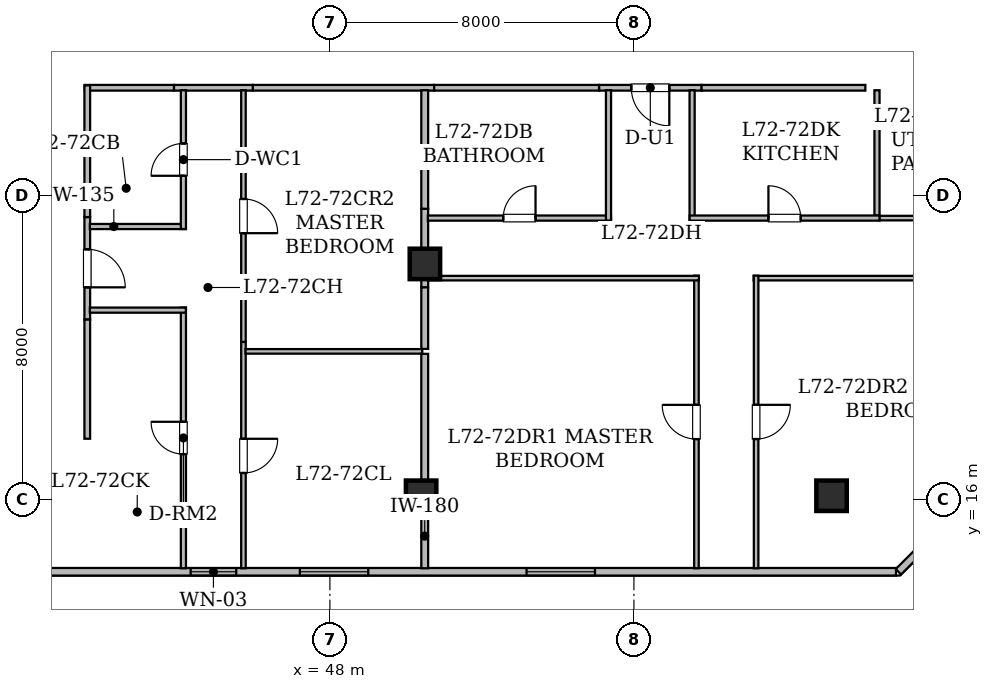
"""IFC4 building model, lengths in metres.
Left out: names, types, materials, properties, quantities, classifications, styles, units other than length and angle.
Written with IfcOpenShell. Run it as: python <this file> out.ifc"""

import sys

from ifc_helpers import new_model, si_unit, direction, frame, frame_2d, origin, origin_2d, place, context, subcontext, project, spatial, rectangle, hollow_rectangle, extrude, element, fill, save


model = new_model("IFC4")
c1 = context("Model", 3, precision=1e-05, world=origin(), true_north=direction((0.0, 1.0)))
c2 = subcontext(c1, "Body", "Model", "MODEL_VIEW")
j1 = project(units=[si_unit("LENGTHUNIT", "METRE"), si_unit("PLANEANGLEUNIT", "RADIAN")], contexts=[c1])
p1 = place(None, origin())
s1 = spatial("IfcSite", under=j1, at=p1, CompositionType="ELEMENT")
p2 = place(p1, origin())
s2 = spatial("IfcBuilding", under=s1, at=p2, CompositionType="ELEMENT")
p3 = place(p2, frame((0.0, 0.0, 282.05)))
s3 = spatial("IfcBuildingStorey", under=s2, at=p3, CompositionType="ELEMENT", Elevation=282.05)
for number, where, z_axis, x_axis in (
    (1, (50.4, 16.1, 0.0), (0.0, 0.0, 1.0), (1.0, 0.0, 0.0)),
    (2, (61.2, 16.1, 0.0), (0.0, 0.0, 1.0), (1.0, 0.0, 0.0)),
):
    element("IfcColumn", number, at=place(p3, frame(where, z_axis=z_axis, x_axis=x_axis)), inside=s3, PredefinedType="COLUMN", context=c2, shape_type="SweptSolid", body=[
        extrude(hollow_rectangle(XDim=0.8, YDim=0.8, WallThickness=0.04, at=origin_2d()), origin(), (0.0, 0.0, 1.0), 4.175),
    ])
p4 = place(p3, frame((50.5, 22.2, 0.0), z_axis=(0.0, 0.0, 1.0), x_axis=(1.0, 0.0, 0.0)))
e3 = element("IfcColumn", 3, at=p4, inside=s3, PredefinedType="COLUMN", context=c2, shape_type="SweptSolid", body=[
    extrude(hollow_rectangle(XDim=0.8, YDim=0.8, WallThickness=0.04, at=origin_2d()), origin(), (0.0, 0.0, 1.0), 4.2),
])
p5 = place(p3, frame((66.255, 17.396, 0.0), z_axis=(0.0, 0.0, 1.0), x_axis=(-0.707106781187, -0.707106781187, 0.0)))
e4 = element("IfcWall", 4, at=p5, inside=s3, PredefinedType="STANDARD", context=c2, shape_type="SweptSolid", body=[
    extrude(rectangle(XDim=4.661, YDim=0.2, at=frame_2d((2.331, 0.0))), origin(), (0.0, 0.0, 1.0), 3.78),
])
p6 = place(p3, frame((62.896, 14.1, 0.0), z_axis=(0.0, 0.0, 1.0), x_axis=(-1.0, 0.0, 0.0)))
e5 = element("IfcWall", 5, at=p6, inside=s3, PredefinedType="STANDARD", context=c2, shape_type="SweptSolid", body=[
    extrude(rectangle(XDim=35.793, YDim=0.2, at=frame_2d((17.896, 0.0))), origin(), (0.0, 0.0, 1.0), 3.78),
])
p7 = place(p6, frame((17.361, 0.0, 0.78)))
e6 = element("IfcOpeningElement", 6, at=p7, cuts=e5, PredefinedType="OPENING", context=c2, shape_type="SweptSolid", body=[
    extrude(rectangle(XDim=1.2, YDim=1.5, at=frame_2d((0.6, 0.75))), frame((0.0, 0.11, 0.0), z_axis=(0.0, -1.0, 0.0), x_axis=(1.0, 0.0, 0.0)), (0.0, 0.0, 1.0), 0.22),
])
p8 = place(p6, frame((13.886, 0.0, 0.85)))
e7 = element("IfcOpeningElement", 7, at=p8, cuts=e5, PredefinedType="OPENING", context=c2, shape_type="SweptSolid", body=[
    extrude(rectangle(XDim=1.8, YDim=0.92, at=frame_2d((0.9, 0.46))), frame((0.0, 0.11, 0.0), z_axis=(0.0, -1.0, 0.0), x_axis=(1.0, 0.0, 0.0)), (0.0, 0.0, 1.0), 0.22),
])
p9 = place(p6, frame((7.921, 0.0, 0.85)))
e8 = element("IfcOpeningElement", 8, at=p9, cuts=e5, PredefinedType="OPENING", context=c2, shape_type="SweptSolid", body=[
    extrude(rectangle(XDim=1.8, YDim=0.92, at=frame_2d((0.9, 0.46))), frame((0.0, 0.11, 0.0), z_axis=(0.0, -1.0, 0.0), x_axis=(1.0, 0.0, 0.0)), (0.0, 0.0, 1.0), 0.22),
])
p10 = place(p3, frame((45.974, 26.835, 0.0), z_axis=(0.0, 0.0, 1.0), x_axis=(-1.0, 0.0, 0.0)))
e9 = element("IfcWall", 9, at=p10, inside=s3, PredefinedType="STANDARD", context=c2, shape_type="SweptSolid", body=[
    extrude(rectangle(XDim=2.078, YDim=0.15, at=frame_2d((1.039, 0.0))), origin(), (0.0, 0.0, 1.0), 3.78),
])
p11 = place(p3, frame((41.615, 23.433, 0.0), z_axis=(0.0, 0.0, 1.0), x_axis=(0.0, -1.0, 0.0)))
e10 = element("IfcWall", 10, at=p11, inside=s3, PredefinedType="STANDARD", context=c2, shape_type="SweptSolid", body=[
    extrude(rectangle(XDim=2.698, YDim=0.15, at=frame_2d((1.349, 0.0))), origin(), (0.0, 0.0, 1.0), 2.22),
])
p12 = place(p11, frame((0.849, 0.0, 0.0)))
e11 = element("IfcOpeningElement", 11, at=p12, cuts=e10, PredefinedType="OPENING", context=c2, shape_type="SweptSolid", body=[
    extrude(rectangle(XDim=1.0, YDim=2.15, at=frame_2d((0.5, 1.075))), frame((0.0, 0.085, 0.0), z_axis=(0.0, -1.0, 0.0), x_axis=(1.0, 0.0, 0.0)), (0.0, 0.0, 1.0), 0.17),
])
p13 = place(p3, frame((43.896, 26.835, 0.0), z_axis=(0.0, 0.0, 1.0), x_axis=(-1.0, 0.0, 0.0)))
e12 = element("IfcWall", 12, at=p13, inside=s3, PredefinedType="STANDARD", context=c2, shape_type="SweptSolid", body=[
    extrude(rectangle(XDim=2.346, YDim=0.15, at=frame_2d((1.173, 0.0))), origin(), (0.0, 0.0, 1.0), 3.78),
])
p14 = place(p3, frame((41.615, 26.898, 0.0), z_axis=(0.0, 0.0, 1.0), x_axis=(0.0, -1.0, 0.0)))
e13 = element("IfcWall", 13, at=p14, inside=s3, PredefinedType="STANDARD", context=c2, shape_type="SweptSolid", body=[
    extrude(rectangle(XDim=3.465, YDim=0.15, at=frame_2d((1.732, 0.0))), origin(), (0.0, 0.0, 1.0), 2.22),
])
p15 = place(p3, frame((41.615, 20.735, 0.0), z_axis=(0.0, 0.0, 1.0), x_axis=(0.0, -1.0, 0.0)))
e14 = element("IfcWall", 14, at=p15, inside=s3, PredefinedType="STANDARD", context=c2, shape_type="SweptSolid", body=[
    extrude(rectangle(XDim=3.135, YDim=0.15, at=frame_2d((1.567, 0.0))), origin(), (0.0, 0.0, 1.0), 2.22),
])
p16 = place(p3, frame((50.744, 26.835, 0.0), z_axis=(0.0, 0.0, 1.0), x_axis=(-1.0, 0.0, 0.0)))
e15 = element("IfcWall", 15, at=p16, inside=s3, PredefinedType="STANDARD", context=c2, shape_type="SweptSolid", body=[
    extrude(rectangle(XDim=4.77, YDim=0.15, at=frame_2d((2.385, 0.0))), origin(), (0.0, 0.0, 1.0), 2.22),
])
p17 = place(p3, frame((57.78, 26.835, 0.0), z_axis=(0.0, 0.0, 1.0), x_axis=(-1.0, 0.0, 0.0)))
e16 = element("IfcWall", 16, at=p17, inside=s3, PredefinedType="STANDARD", context=c2, shape_type="SweptSolid", body=[
    extrude(rectangle(XDim=2.698, YDim=0.15, at=frame_2d((1.349, 0.0))), origin(), (0.0, 0.0, 1.0), 3.78),
])
p18 = place(p17, frame((0.849, 0.0, 0.0)))
e17 = element("IfcOpeningElement", 17, at=p18, cuts=e16, PredefinedType="OPENING", context=c2, shape_type="SweptSolid", body=[
    extrude(rectangle(XDim=1.0, YDim=2.15, at=frame_2d((0.5, 1.075))), frame((0.0, 0.085, 0.0), z_axis=(0.0, -1.0, 0.0), x_axis=(1.0, 0.0, 0.0)), (0.0, 0.0, 1.0), 0.17),
])
p19 = place(p3, frame((55.082, 26.835, 0.0), z_axis=(0.0, 0.0, 1.0), x_axis=(-1.0, 0.0, 0.0)))
e18 = element("IfcWall", 18, at=p19, inside=s3, PredefinedType="STANDARD", context=c2, shape_type="SweptSolid", body=[
    extrude(rectangle(XDim=4.338, YDim=0.15, at=frame_2d((2.169, 0.0))), origin(), (0.0, 0.0, 1.0), 2.22),
])
p20 = place(p3, frame((62.09, 26.835, 0.0), z_axis=(0.0, 0.0, 1.0), x_axis=(-1.0, 0.0, 0.0)))
e19 = element("IfcWall", 19, at=p20, inside=s3, PredefinedType="STANDARD", context=c2, shape_type="SweptSolid", body=[
    extrude(rectangle(XDim=4.31, YDim=0.15, at=frame_2d((2.155, 0.0))), origin(), (0.0, 0.0, 1.0), 3.78),
])
p21 = place(p3, frame((41.682, 23.184, 0.0), z_axis=(0.0, 0.0, 1.0), x_axis=(1.0, 0.0, 0.0)))
e20 = element("IfcWall", 20, at=p21, inside=s3, PredefinedType="PARTITIONING", context=c2, shape_type="SweptSolid", body=[
    extrude(rectangle(XDim=2.528, YDim=0.135, at=frame_2d((1.264, 0.0))), origin(), (0.0, 0.0, 1.0), 2.22),
])
p22 = place(p3, frame((44.145, 23.119, 0.0), z_axis=(0.0, 0.0, 1.0), x_axis=(0.0, 1.0, 0.0)))
e21 = element("IfcWall", 21, at=p22, inside=s3, PredefinedType="PARTITIONING", context=c2, shape_type="SweptSolid", body=[
    extrude(rectangle(XDim=3.651, YDim=0.135, at=frame_2d((1.826, 0.0))), origin(), (0.0, 0.0, 1.0), 2.22),
])
p23 = place(p22, frame((1.4, 0.0, 0.0)))
e22 = element("IfcOpeningElement", 22, at=p23, cuts=e21, PredefinedType="OPENING", context=c2, shape_type="SweptSolid", body=[
    extrude(rectangle(XDim=0.85, YDim=2.1, at=frame_2d((0.425, 1.05))), frame((0.0, 0.077, 0.0), z_axis=(0.0, -1.0, 0.0), x_axis=(1.0, 0.0, 0.0)), (0.0, 0.0, 1.0), 0.155),
])
p24 = place(p3, frame((44.145, 14.192, 0.0), z_axis=(0.0, 0.0, 1.0), x_axis=(0.0, 1.0, 0.0)))
e23 = element("IfcWall", 23, at=p24, inside=s3, PredefinedType="PARTITIONING", context=c2, shape_type="SweptSolid", body=[
    extrude(rectangle(XDim=6.857, YDim=0.135, at=frame_2d((3.429, 0.0))), origin(), (0.0, 0.0, 1.0), 2.22),
])
p25 = place(p24, frame((3.004, 0.0, 0.0)))
e24 = element("IfcOpeningElement", 24, at=p25, cuts=e23, PredefinedType="OPENING", context=c2, shape_type="SweptSolid", body=[
    extrude(rectangle(XDim=0.85, YDim=2.1, at=frame_2d((0.425, 1.05))), frame((0.0, 0.077, 0.0), z_axis=(0.0, -1.0, 0.0), x_axis=(1.0, 0.0, 0.0)), (0.0, 0.0, 1.0), 0.155),
])
p26 = place(p3, frame((44.21, 20.984, 0.0), z_axis=(0.0, 0.0, 1.0), x_axis=(-1.0, 0.0, 0.0)))
e25 = element("IfcWall", 25, at=p26, inside=s3, PredefinedType="PARTITIONING", context=c2, shape_type="SweptSolid", body=[
    extrude(rectangle(XDim=2.528, YDim=0.135, at=frame_2d((1.264, 0.0))), origin(), (0.0, 0.0, 1.0), 3.78),
])
p27 = place(p3, frame((45.725, 20.148, 0.0), z_axis=(0.0, 0.0, 1.0), x_axis=(0.0, -1.0, 0.0)))
e26 = element("IfcWall", 26, at=p27, inside=s3, PredefinedType="PARTITIONING", context=c2, shape_type="SweptSolid", body=[
    extrude(rectangle(XDim=5.956, YDim=0.12, at=frame_2d((2.978, 0.0))), origin(), (0.0, 0.0, 1.0), 2.22),
])
p28 = place(p27, frame((2.549, 0.0, 0.0)))
e27 = element("IfcOpeningElement", 27, at=p28, cuts=e26, PredefinedType="OPENING", context=c2, shape_type="SweptSolid", body=[
    extrude(rectangle(XDim=0.9, YDim=2.1, at=frame_2d((0.45, 1.05))), frame((0.0, 0.07, 0.0), z_axis=(0.0, -1.0, 0.0), x_axis=(1.0, 0.0, 0.0)), (0.0, 0.0, 1.0), 0.14),
])
p29 = place(p3, frame((45.725, 26.77, 0.0), z_axis=(0.0, 0.0, 1.0), x_axis=(0.0, -1.0, 0.0)))
e28 = element("IfcWall", 28, at=p29, inside=s3, PredefinedType="PARTITIONING", context=c2, shape_type="SweptSolid", body=[
    extrude(rectangle(XDim=6.622, YDim=0.12, at=frame_2d((3.311, 0.0))), origin(), (0.0, 0.0, 1.0), 2.22),
])
p30 = place(p29, frame((2.861, 0.0, 0.0)))
e29 = element("IfcOpeningElement", 29, at=p30, cuts=e28, PredefinedType="OPENING", context=c2, shape_type="SweptSolid", body=[
    extrude(rectangle(XDim=0.9, YDim=2.1, at=frame_2d((0.45, 1.05))), frame((0.0, 0.07, 0.0), z_axis=(0.0, -1.0, 0.0), x_axis=(1.0, 0.0, 0.0)), (0.0, 0.0, 1.0), 0.14),
])
p31 = place(p3, frame((45.779, 19.899, 0.0), z_axis=(0.0, 0.0, 1.0), x_axis=(1.0, 0.0, 0.0)))
e30 = element("IfcWall", 30, at=p31, inside=s3, PredefinedType="PARTITIONING", context=c2, shape_type="SweptSolid", body=[
    extrude(rectangle(XDim=4.651, YDim=0.12, at=frame_2d((2.325, 0.0))), origin(), (0.0, 0.0, 1.0), 2.837),
])
p32 = place(p3, frame((50.495, 19.834, 0.0), z_axis=(0.0, 0.0, 1.0), x_axis=(0.0, -1.0, 0.0)))
e31 = element("IfcWall", 31, at=p32, inside=s3, PredefinedType="STANDARD", context=c2, shape_type="SweptSolid", body=[
    extrude(rectangle(XDim=5.642, YDim=0.18, at=frame_2d((2.821, 0.0))), origin(), (0.0, 0.0, 1.0), 2.22),
])
p33 = place(p3, frame((50.495, 23.651, 0.0), z_axis=(0.0, 0.0, 1.0), x_axis=(0.0, -1.0, 0.0)))
e32 = element("IfcWall", 32, at=p33, inside=s3, PredefinedType="STANDARD", context=c2, shape_type="SweptSolid", body=[
    extrude(rectangle(XDim=2.069, YDim=0.18, at=frame_2d((1.034, 0.0))), origin(), (0.0, 0.0, 1.0), 2.22),
])
p34 = place(p3, frame((50.495, 26.77, 0.0), z_axis=(0.0, 0.0, 1.0), x_axis=(0.0, -1.0, 0.0)))
e33 = element("IfcWall", 33, at=p34, inside=s3, PredefinedType="STANDARD", context=c2, shape_type="SweptSolid", body=[
    extrude(rectangle(XDim=3.119, YDim=0.18, at=frame_2d((1.56, 0.0))), origin(), (0.0, 0.0, 1.0), 2.22),
])
p35 = place(p3, frame((50.495, 21.582, 0.0), z_axis=(0.0, 0.0, 1.0), x_axis=(0.0, -1.0, 0.0)))
e34 = element("IfcWall", 34, at=p35, inside=s3, PredefinedType="STANDARD", context=c2, shape_type="SweptSolid", body=[
    extrude(rectangle(XDim=1.618, YDim=0.18, at=frame_2d((0.809, 0.0))), origin(), (0.0, 0.0, 1.0), 2.837),
])
p36 = place(p3, frame((66.208, 23.406, 0.0), z_axis=(0.0, 0.0, 1.0), x_axis=(-1.0, 0.0, 0.0)))
e35 = element("IfcWall", 35, at=p36, inside=s3, PredefinedType="PARTITIONING", context=c2, shape_type="SweptSolid", body=[
    extrude(rectangle(XDim=3.747, YDim=0.12, at=frame_2d((1.874, 0.0))), origin(), (0.0, 0.0, 1.0), 2.22),
])
p37 = place(p36, frame((1.423, 0.0, 0.0)))
e36 = element("IfcOpeningElement", 36, at=p37, cuts=e35, PredefinedType="OPENING", context=c2, shape_type="SweptSolid", body=[
    extrude(rectangle(XDim=0.9, YDim=2.1, at=frame_2d((0.45, 1.05))), frame((0.0, 0.07, 0.0), z_axis=(0.0, -1.0, 0.0), x_axis=(1.0, 0.0, 0.0)), (0.0, 0.0, 1.0), 0.14),
])
p38 = place(p3, frame((62.396, 23.471, 0.0), z_axis=(0.0, 0.0, 1.0), x_axis=(0.0, 1.0, 0.0)))
e37 = element("IfcWall", 37, at=p38, inside=s3, PredefinedType="PARTITIONING", context=c2, shape_type="SweptSolid", body=[
    extrude(rectangle(XDim=3.299, YDim=0.135, at=frame_2d((1.649, 0.0))), origin(), (0.0, 0.0, 1.0), 2.22),
])
p39 = place(p3, frame((50.577, 23.406, 0.0), z_axis=(0.0, 0.0, 1.0), x_axis=(1.0, 0.0, 0.0)))
e38 = element("IfcWall", 38, at=p39, inside=s3, PredefinedType="PARTITIONING", context=c2, shape_type="SweptSolid", body=[
    extrude(rectangle(XDim=4.819, YDim=0.135, at=frame_2d((2.41, 0.0))), origin(), (0.0, 0.0, 1.0), 2.22),
])
p40 = place(p39, frame((1.984, 0.0, 0.0)))
e39 = element("IfcOpeningElement", 39, at=p40, cuts=e38, PredefinedType="OPENING", context=c2, shape_type="SweptSolid", body=[
    extrude(rectangle(XDim=0.85, YDim=2.1, at=frame_2d((0.425, 1.05))), frame((0.0, 0.077, 0.0), z_axis=(0.0, -1.0, 0.0), x_axis=(1.0, 0.0, 0.0)), (0.0, 0.0, 1.0), 0.155),
])
for number, where, z_axis, x_axis in (
    (40, (55.331, 23.341, 0.0), (0.0, 0.0, 1.0), (0.0, 1.0, 0.0)),
    (41, (57.531, 26.77, 0.0), (0.0, 0.0, 1.0), (0.0, -1.0, 0.0)),
):
    element("IfcWall", number, at=place(p3, frame(where, z_axis=z_axis, x_axis=x_axis)), inside=s3, PredefinedType="PARTITIONING", context=c2, shape_type="SweptSolid", body=[
        extrude(rectangle(XDim=3.429, YDim=0.135, at=frame_2d((1.714, 0.0))), origin(), (0.0, 0.0, 1.0), 3.78),
    ])
p41 = place(p3, frame((57.466, 23.406, 0.0), z_axis=(0.0, 0.0, 1.0), x_axis=(1.0, 0.0, 0.0)))
e42 = element("IfcWall", 42, at=p41, inside=s3, PredefinedType="PARTITIONING", context=c2, shape_type="SweptSolid", body=[
    extrude(rectangle(XDim=4.995, YDim=0.135, at=frame_2d((2.498, 0.0))), origin(), (0.0, 0.0, 1.0), 2.22),
])
p42 = place(p41, frame((2.073, 0.0, 0.0)))
e43 = element("IfcOpeningElement", 43, at=p42, cuts=e42, PredefinedType="OPENING", context=c2, shape_type="SweptSolid", body=[
    extrude(rectangle(XDim=0.85, YDim=2.1, at=frame_2d((0.425, 1.05))), frame((0.0, 0.077, 0.0), z_axis=(0.0, -1.0, 0.0), x_axis=(1.0, 0.0, 0.0)), (0.0, 0.0, 1.0), 0.155),
])
p43 = place(p3, frame((57.645, 14.192, 0.0), z_axis=(0.0, 0.0, 1.0), x_axis=(0.0, 1.0, 0.0)))
e44 = element("IfcWall", 44, at=p43, inside=s3, PredefinedType="PARTITIONING", context=c2, shape_type="SweptSolid", body=[
    extrude(rectangle(XDim=7.699, YDim=0.12, at=frame_2d((3.85, 0.0))), origin(), (0.0, 0.0, 1.0), 2.22),
])
p44 = place(p43, frame((3.399, 0.0, 0.0)))
e45 = element("IfcOpeningElement", 45, at=p44, cuts=e44, PredefinedType="OPENING", context=c2, shape_type="SweptSolid", body=[
    extrude(rectangle(XDim=0.9, YDim=2.1, at=frame_2d((0.45, 1.05))), frame((0.0, 0.07, 0.0), z_axis=(0.0, -1.0, 0.0), x_axis=(1.0, 0.0, 0.0)), (0.0, 0.0, 1.0), 0.14),
])
p45 = place(p3, frame((57.71, 21.826, 0.0), z_axis=(0.0, 0.0, 1.0), x_axis=(-1.0, 0.0, 0.0)))
e46 = element("IfcWall", 46, at=p45, inside=s3, PredefinedType="PARTITIONING", context=c2, shape_type="SweptSolid", body=[
    extrude(rectangle(XDim=7.133, YDim=0.12, at=frame_2d((3.566, 0.0))), origin(), (0.0, 0.0, 1.0), 2.22),
])
p46 = place(p3, frame((66.208, 21.826, 0.0), z_axis=(0.0, 0.0, 1.0), x_axis=(-1.0, 0.0, 0.0)))
e47 = element("IfcWall", 47, at=p46, inside=s3, PredefinedType="PARTITIONING", context=c2, shape_type="SweptSolid", body=[
    extrude(rectangle(XDim=7.058, YDim=0.12, at=frame_2d((3.529, 0.0))), origin(), (0.0, 0.0, 1.0), 2.22),
])
p47 = place(p3, frame((59.215, 21.891, 0.0), z_axis=(0.0, 0.0, 1.0), x_axis=(0.0, -1.0, 0.0)))
e48 = element("IfcWall", 48, at=p47, inside=s3, PredefinedType="PARTITIONING", context=c2, shape_type="SweptSolid", body=[
    extrude(rectangle(XDim=7.699, YDim=0.12, at=frame_2d((3.85, 0.0))), origin(), (0.0, 0.0, 1.0), 2.22),
])
p48 = place(p47, frame((3.399, 0.0, 0.0)))
e49 = element("IfcOpeningElement", 49, at=p48, cuts=e48, PredefinedType="OPENING", context=c2, shape_type="SweptSolid", body=[
    extrude(rectangle(XDim=0.9, YDim=2.1, at=frame_2d((0.45, 1.05))), frame((0.0, 0.07, 0.0), z_axis=(0.0, -1.0, 0.0), x_axis=(1.0, 0.0, 0.0)), (0.0, 0.0, 1.0), 0.14),
])
p49 = place(p7, origin())
e50 = element("IfcWindow", 50, at=p49, inside=s3, PartitioningType="SINGLE_PANEL", PredefinedType="WINDOW", context=c2, shape_type="SweptSolid", body=[
    extrude(rectangle(XDim=1.2, YDim=1.5, at=frame_2d((0.6, 0.75))), frame((0.0, 0.03, 0.0), z_axis=(0.0, -1.0, 0.0), x_axis=(1.0, 0.0, 0.0)), (0.0, 0.0, 1.0), 0.06),
])
fill(e6, e50)
p50 = place(p8, origin())
e51 = element("IfcWindow", 51, at=p50, inside=s3, PartitioningType="SINGLE_PANEL", PredefinedType="WINDOW", context=c2, shape_type="SweptSolid", body=[
    extrude(rectangle(XDim=1.8, YDim=0.92, at=frame_2d((0.9, 0.46))), frame((0.0, 0.03, 0.0), z_axis=(0.0, -1.0, 0.0), x_axis=(1.0, 0.0, 0.0)), (0.0, 0.0, 1.0), 0.06),
])
fill(e7, e51)
p51 = place(p9, origin())
e52 = element("IfcWindow", 52, at=p51, inside=s3, PartitioningType="SINGLE_PANEL", PredefinedType="WINDOW", context=c2, shape_type="SweptSolid", body=[
    extrude(rectangle(XDim=1.8, YDim=0.92, at=frame_2d((0.9, 0.46))), frame((0.0, 0.03, 0.0), z_axis=(0.0, -1.0, 0.0), x_axis=(1.0, 0.0, 0.0)), (0.0, 0.0, 1.0), 0.06),
])
fill(e8, e52)
p52 = place(p12, origin())
e53 = element("IfcDoor", 53, at=p52, inside=s3, OperationType="SINGLE_SWING_RIGHT", PredefinedType="DOOR", context=c2, shape_type="SweptSolid", body=[
    extrude(rectangle(XDim=1.0, YDim=2.15, at=frame_2d((0.5, 1.075))), frame((0.0, 0.025, 0.0), z_axis=(0.0, -1.0, 0.0), x_axis=(1.0, 0.0, 0.0)), (0.0, 0.0, 1.0), 0.05),
])
fill(e11, e53)
p53 = place(p18, origin())
e54 = element("IfcDoor", 54, at=p53, inside=s3, OperationType="SINGLE_SWING_LEFT", PredefinedType="DOOR", context=c2, shape_type="SweptSolid", body=[
    extrude(rectangle(XDim=1.0, YDim=2.15, at=frame_2d((0.5, 1.075))), frame((0.0, 0.025, 0.0), z_axis=(0.0, -1.0, 0.0), x_axis=(1.0, 0.0, 0.0)), (0.0, 0.0, 1.0), 0.05),
])
fill(e17, e54)
p54 = place(p23, origin())
e55 = element("IfcDoor", 55, at=p54, inside=s3, OperationType="SINGLE_SWING_LEFT", PredefinedType="DOOR", context=c2, shape_type="SweptSolid", body=[
    extrude(rectangle(XDim=0.85, YDim=2.1, at=frame_2d((0.425, 1.05))), frame((0.0, 0.025, 0.0), z_axis=(0.0, -1.0, 0.0), x_axis=(1.0, 0.0, 0.0)), (0.0, 0.0, 1.0), 0.05),
])
fill(e22, e55)
p55 = place(p25, origin())
e56 = element("IfcDoor", 56, at=p55, inside=s3, OperationType="SINGLE_SWING_RIGHT", PredefinedType="DOOR", context=c2, shape_type="SweptSolid", body=[
    extrude(rectangle(XDim=0.85, YDim=2.1, at=frame_2d((0.425, 1.05))), frame((0.0, 0.025, 0.0), z_axis=(0.0, -1.0, 0.0), x_axis=(1.0, 0.0, 0.0)), (0.0, 0.0, 1.0), 0.05),
])
fill(e24, e56)
p56 = place(p28, origin())
e57 = element("IfcDoor", 57, at=p56, inside=s3, OperationType="SINGLE_SWING_LEFT", PredefinedType="DOOR", context=c2, shape_type="SweptSolid", body=[
    extrude(rectangle(XDim=0.9, YDim=2.1, at=frame_2d((0.45, 1.05))), frame((0.0, 0.025, 0.0), z_axis=(0.0, -1.0, 0.0), x_axis=(1.0, 0.0, 0.0)), (0.0, 0.0, 1.0), 0.05),
])
fill(e27, e57)
p57 = place(p30, origin())
e58 = element("IfcDoor", 58, at=p57, inside=s3, OperationType="SINGLE_SWING_RIGHT", PredefinedType="DOOR", context=c2, shape_type="SweptSolid", body=[
    extrude(rectangle(XDim=0.9, YDim=2.1, at=frame_2d((0.45, 1.05))), frame((0.0, 0.025, 0.0), z_axis=(0.0, -1.0, 0.0), x_axis=(1.0, 0.0, 0.0)), (0.0, 0.0, 1.0), 0.05),
])
fill(e29, e58)
p58 = place(p40, origin())
e59 = element("IfcDoor", 59, at=p58, inside=s3, OperationType="SINGLE_SWING_RIGHT", PredefinedType="DOOR", context=c2, shape_type="SweptSolid", body=[
    extrude(rectangle(XDim=0.85, YDim=2.1, at=frame_2d((0.425, 1.05))), frame((0.0, 0.025, 0.0), z_axis=(0.0, -1.0, 0.0), x_axis=(1.0, 0.0, 0.0)), (0.0, 0.0, 1.0), 0.05),
])
fill(e39, e59)
p59 = place(p42, origin())
e60 = element("IfcDoor", 60, at=p59, inside=s3, OperationType="SINGLE_SWING_LEFT", PredefinedType="DOOR", context=c2, shape_type="SweptSolid", body=[
    extrude(rectangle(XDim=0.85, YDim=2.1, at=frame_2d((0.425, 1.05))), frame((0.0, 0.025, 0.0), z_axis=(0.0, -1.0, 0.0), x_axis=(1.0, 0.0, 0.0)), (0.0, 0.0, 1.0), 0.05),
])
fill(e43, e60)
p60 = place(p44, origin())
e61 = element("IfcDoor", 61, at=p60, inside=s3, OperationType="SINGLE_SWING_RIGHT", PredefinedType="DOOR", context=c2, shape_type="SweptSolid", body=[
    extrude(rectangle(XDim=0.9, YDim=2.1, at=frame_2d((0.45, 1.05))), frame((0.0, 0.025, 0.0), z_axis=(0.0, -1.0, 0.0), x_axis=(1.0, 0.0, 0.0)), (0.0, 0.0, 1.0), 0.05),
])
fill(e45, e61)
p61 = place(p48, origin())
e62 = element("IfcDoor", 62, at=p61, inside=s3, OperationType="SINGLE_SWING_LEFT", PredefinedType="DOOR", context=c2, shape_type="SweptSolid", body=[
    extrude(rectangle(XDim=0.9, YDim=2.1, at=frame_2d((0.45, 1.05))), frame((0.0, 0.025, 0.0), z_axis=(0.0, -1.0, 0.0), x_axis=(1.0, 0.0, 0.0)), (0.0, 0.0, 1.0), 0.05),
])
fill(e49, e62)
save(model, sys.argv[1])
